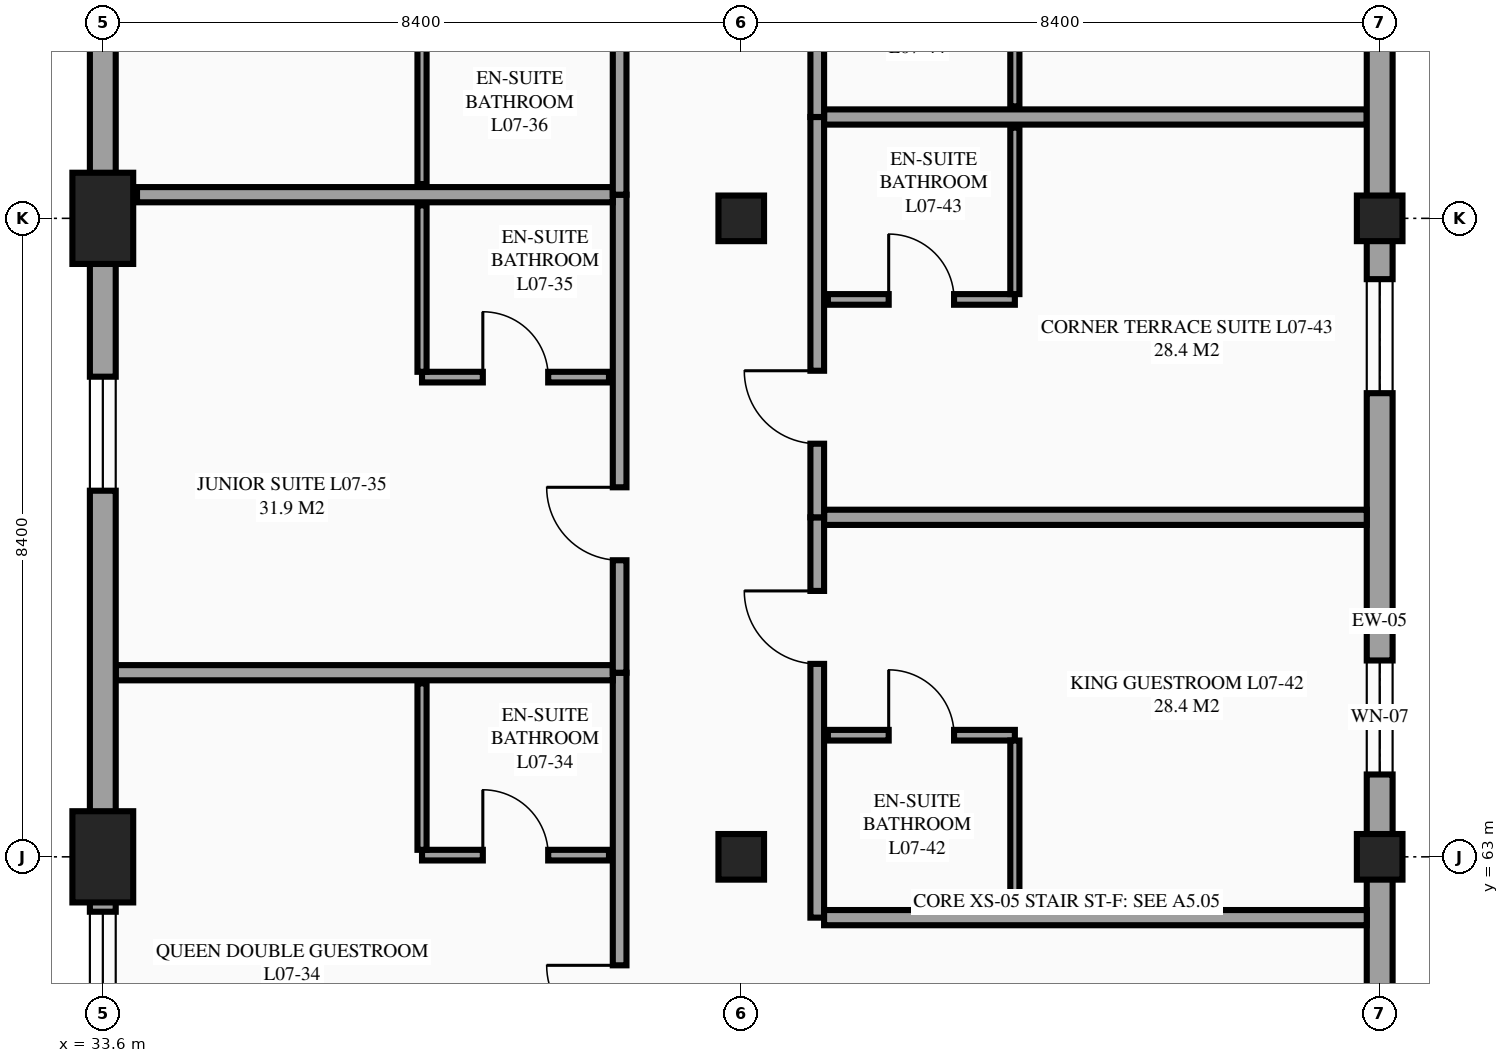
"""IFC4 building model, lengths in metres.
Left out: names, types, materials, properties, quantities, classifications, styles, units other than length and angle.
Written with IfcOpenShell. Run it as: python <this file> out.ifc"""

import sys

from ifc_helpers import new_model, si_unit, direction, frame, frame_2d, origin, origin_2d, place, context, subcontext, project, spatial, rectangle, extrude, element, fill, save


model = new_model("IFC4")
c1 = context("Model", 3, precision=1e-05, world=origin(), true_north=direction((0.0, 1.0)))
c2 = subcontext(c1, "Body", "Model", "MODEL_VIEW")
j1 = project(units=[si_unit("LENGTHUNIT", "METRE"), si_unit("PLANEANGLEUNIT", "RADIAN")], contexts=[c1])
p1 = place(None, origin())
s1 = spatial("IfcSite", under=j1, at=p1, CompositionType="ELEMENT")
p2 = place(p1, origin())
s2 = spatial("IfcBuilding", under=s1, at=p2, CompositionType="ELEMENT")
p3 = place(p2, frame((0.0, 0.0, 29.1)))
s3 = spatial("IfcBuildingStorey", under=s2, at=p3, CompositionType="ELEMENT", Elevation=29.1)
for number, where, z_axis, x_axis in (
    (1, (33.6, 63.0, 0.0), (0.0, 0.0, 1.0), (1.0, 0.0, 0.0)),
    (2, (33.6, 71.4, 0.0), (0.0, 0.0, 1.0), (1.0, 0.0, 0.0)),
):
    element("IfcColumn", number, at=place(p3, frame(where, z_axis=z_axis, x_axis=x_axis)), inside=s3, PredefinedType="COLUMN", context=c2, shape_type="SweptSolid", body=[
        extrude(rectangle(XDim=0.8, YDim=1.2, at=origin_2d()), origin(), (0.0, 0.0, 1.0), 3.6),
    ])
for number, where, z_axis, x_axis in (
    (3, (42.0, 63.0, 0.0), (0.0, 0.0, 1.0), (1.0, 0.0, 0.0)),
    (4, (42.0, 71.4, 0.0), (0.0, 0.0, 1.0), (1.0, 0.0, 0.0)),
    (5, (50.4, 63.0, 0.0), (0.0, 0.0, 1.0), (1.0, 0.0, 0.0)),
    (6, (50.4, 71.4, 0.0), (0.0, 0.0, 1.0), (1.0, 0.0, 0.0)),
):
    element("IfcColumn", number, at=place(p3, frame(where, z_axis=z_axis, x_axis=x_axis)), inside=s3, PredefinedType="COLUMN", context=c2, shape_type="SweptSolid", body=[
        extrude(rectangle(XDim=0.6, YDim=0.6, at=origin_2d()), origin(), (0.0, 0.0, 1.0), 3.6),
    ])
p4 = place(p3, frame((50.4, 60.8, 0.0), z_axis=(0.0, 0.0, 1.0), x_axis=(0.0, 1.0, 0.0)))
e7 = element("IfcWall", 7, at=p4, inside=s3, PredefinedType="STANDARD", context=c2, shape_type="SweptSolid", body=[
    extrude(rectangle(XDim=10.6, YDim=0.34, at=frame_2d((5.3, 0.0))), origin(), (0.0, 0.0, 1.0), 2.48),
])
p5 = place(p4, frame((3.283, 0.0, 0.85)))
e8 = element("IfcOpeningElement", 8, at=p5, cuts=e7, PredefinedType="OPENING", context=c2, shape_type="SweptSolid", body=[
    extrude(rectangle(XDim=1.5, YDim=1.5, at=frame_2d((0.75, 0.75))), frame((0.0, 0.18, 0.0), z_axis=(0.0, -1.0, 0.0), x_axis=(1.0, 0.0, 0.0)), (0.0, 0.0, 1.0), 0.36),
])
p6 = place(p4, frame((8.3, 0.0, 0.85)))
e9 = element("IfcOpeningElement", 9, at=p6, cuts=e7, PredefinedType="OPENING", context=c2, shape_type="SweptSolid", body=[
    extrude(rectangle(XDim=1.5, YDim=1.5, at=frame_2d((0.75, 0.75))), frame((0.0, 0.18, 0.0), z_axis=(0.0, -1.0, 0.0), x_axis=(1.0, 0.0, 0.0)), (0.0, 0.0, 1.0), 0.36),
])
p7 = place(p3, frame((40.4, 59.133, 0.0), z_axis=(0.0, 0.0, 1.0), x_axis=(0.0, 1.0, 0.0)))
e10 = element("IfcWall", 10, at=p7, inside=s3, PredefinedType="PARTITIONING", context=c2, shape_type="SweptSolid", body=[
    extrude(rectangle(XDim=6.289, YDim=0.18, at=frame_2d((3.145, 0.0))), origin(), (0.0, 0.0, 1.0), 3.375),
])
p8 = place(p7, frame((1.479, 0.0, 0.0)))
e11 = element("IfcOpeningElement", 11, at=p8, cuts=e10, PredefinedType="OPENING", context=c2, shape_type="SweptSolid", body=[
    extrude(rectangle(XDim=0.96, YDim=2.15, at=frame_2d((0.48, 1.075))), frame((0.0, 0.1, 0.0), z_axis=(0.0, -1.0, 0.0), x_axis=(1.0, 0.0, 0.0)), (0.0, 0.0, 1.0), 0.2),
])
p9 = place(p3, frame((33.77, 65.422, 0.0), z_axis=(0.0, 0.0, 1.0), x_axis=(1.0, 0.0, 0.0)))
e12 = element("IfcWall", 12, at=p9, inside=s3, PredefinedType="PARTITIONING", context=c2, shape_type="SweptSolid", body=[
    extrude(rectangle(XDim=6.54, YDim=0.2, at=frame_2d((3.27, 0.0))), origin(), (0.0, 0.0, 1.0), 3.375),
])
p10 = place(p3, frame((37.8, 63.022, 0.0), z_axis=(0.0, 0.0, 1.0), x_axis=(1.0, 0.0, 0.0)))
e13 = element("IfcWall", 13, at=p10, inside=s3, PredefinedType="PARTITIONING", context=c2, shape_type="SweptSolid", body=[
    extrude(rectangle(XDim=2.46, YDim=0.14, at=frame_2d((1.23, 0.0))), origin(), (0.0, 0.0, 1.0), 2.68),
])
p11 = place(p10, frame((0.8, 0.0, 0.0)))
e14 = element("IfcOpeningElement", 14, at=p11, cuts=e13, PredefinedType="OPENING", context=c2, shape_type="SweptSolid", body=[
    extrude(rectangle(XDim=0.86, YDim=2.1, at=frame_2d((0.43, 1.05))), frame((0.0, 0.08, 0.0), z_axis=(0.0, -1.0, 0.0), x_axis=(1.0, 0.0, 0.0)), (0.0, 0.0, 1.0), 0.16),
])
p12 = place(p3, frame((37.8, 63.092, 0.0), z_axis=(0.0, 0.0, 1.0), x_axis=(0.0, 1.0, 0.0)))
e15 = element("IfcWall", 15, at=p12, inside=s3, PredefinedType="PARTITIONING", context=c2, shape_type="SweptSolid", body=[
    extrude(rectangle(XDim=2.19, YDim=0.12, at=frame_2d((1.095, 0.0))), origin(), (0.0, 0.0, 1.0), 3.375),
])
p13 = place(p3, frame((40.4, 65.422, 0.0), z_axis=(0.0, 0.0, 1.0), x_axis=(0.0, 1.0, 0.0)))
e16 = element("IfcWall", 16, at=p13, inside=s3, PredefinedType="PARTITIONING", context=c2, shape_type="SweptSolid", body=[
    extrude(rectangle(XDim=6.289, YDim=0.18, at=frame_2d((3.145, 0.0))), origin(), (0.0, 0.0, 1.0), 3.375),
])
p14 = place(p13, frame((1.479, 0.0, 0.0)))
e17 = element("IfcOpeningElement", 17, at=p14, cuts=e16, PredefinedType="OPENING", context=c2, shape_type="SweptSolid", body=[
    extrude(rectangle(XDim=0.96, YDim=2.15, at=frame_2d((0.48, 1.075))), frame((0.0, 0.1, 0.0), z_axis=(0.0, -1.0, 0.0), x_axis=(1.0, 0.0, 0.0)), (0.0, 0.0, 1.0), 0.2),
])
p15 = place(p3, frame((34.05, 71.711, 0.0), z_axis=(0.0, 0.0, 1.0), x_axis=(1.0, 0.0, 0.0)))
e18 = element("IfcWall", 18, at=p15, inside=s3, PredefinedType="PARTITIONING", context=c2, shape_type="SweptSolid", body=[
    extrude(rectangle(XDim=6.26, YDim=0.2, at=frame_2d((3.13, 0.0))), origin(), (0.0, 0.0, 1.0), 3.375),
])
p16 = place(p3, frame((37.8, 69.311, 0.0), z_axis=(0.0, 0.0, 1.0), x_axis=(1.0, 0.0, 0.0)))
e19 = element("IfcWall", 19, at=p16, inside=s3, PredefinedType="PARTITIONING", context=c2, shape_type="SweptSolid", body=[
    extrude(rectangle(XDim=2.46, YDim=0.14, at=frame_2d((1.23, 0.0))), origin(), (0.0, 0.0, 1.0), 3.375),
])
p17 = place(p16, frame((0.8, 0.0, 0.0)))
e20 = element("IfcOpeningElement", 20, at=p17, cuts=e19, PredefinedType="OPENING", context=c2, shape_type="SweptSolid", body=[
    extrude(rectangle(XDim=0.86, YDim=2.1, at=frame_2d((0.43, 1.05))), frame((0.0, 0.08, 0.0), z_axis=(0.0, -1.0, 0.0), x_axis=(1.0, 0.0, 0.0)), (0.0, 0.0, 1.0), 0.16),
])
p18 = place(p3, frame((37.8, 69.381, 0.0), z_axis=(0.0, 0.0, 1.0), x_axis=(0.0, 1.0, 0.0)))
e21 = element("IfcWall", 21, at=p18, inside=s3, PredefinedType="PARTITIONING", context=c2, shape_type="SweptSolid", body=[
    extrude(rectangle(XDim=2.19, YDim=0.12, at=frame_2d((1.095, 0.0))), origin(), (0.0, 0.0, 1.0), 3.375),
])
p19 = place(p3, frame((40.4, 71.711, 0.0), z_axis=(0.0, 0.0, 1.0), x_axis=(0.0, 1.0, 0.0)))
e22 = element("IfcWall", 22, at=p19, inside=s3, PredefinedType="PARTITIONING", context=c2, shape_type="SweptSolid", body=[
    extrude(rectangle(XDim=6.289, YDim=0.18, at=frame_2d((3.145, 0.0))), origin(), (0.0, 0.0, 1.0), 3.375),
])
p20 = place(p19, frame((3.849, 0.0, 0.0)))
e23 = element("IfcOpeningElement", 23, at=p20, cuts=e22, PredefinedType="OPENING", context=c2, shape_type="SweptSolid", body=[
    extrude(rectangle(XDim=0.96, YDim=2.15, at=frame_2d((0.48, 1.075))), frame((0.0, 0.1, 0.0), z_axis=(0.0, -1.0, 0.0), x_axis=(1.0, 0.0, 0.0)), (0.0, 0.0, 1.0), 0.2),
])
p21 = place(p3, frame((37.8, 71.851, 0.0), z_axis=(0.0, 0.0, 1.0), x_axis=(0.0, 1.0, 0.0)))
e24 = element("IfcWall", 24, at=p21, inside=s3, PredefinedType="PARTITIONING", context=c2, shape_type="SweptSolid", body=[
    extrude(rectangle(XDim=2.19, YDim=0.12, at=frame_2d((1.095, 0.0))), origin(), (0.0, 0.0, 1.0), 3.375),
])
p22 = place(p3, frame((43.0, 62.2, 0.0), z_axis=(0.0, 0.0, 1.0), x_axis=(0.0, 1.0, 0.0)))
e25 = element("IfcWall", 25, at=p22, inside=s3, PredefinedType="PARTITIONING", context=c2, shape_type="SweptSolid", body=[
    extrude(rectangle(XDim=5.267, YDim=0.18, at=frame_2d((2.633, 0.0))), origin(), (0.0, 0.0, 1.0), 3.375),
])
p23 = place(p22, frame((3.338, 0.0, 0.0)))
e26 = element("IfcOpeningElement", 26, at=p23, cuts=e25, PredefinedType="OPENING", context=c2, shape_type="SweptSolid", body=[
    extrude(rectangle(XDim=0.96, YDim=2.15, at=frame_2d((0.48, 1.075))), frame((0.0, 0.1, 0.0), z_axis=(0.0, -1.0, 0.0), x_axis=(1.0, 0.0, 0.0)), (0.0, 0.0, 1.0), 0.2),
])
for number, where, z_axis, x_axis in (
    (27, (43.09, 62.2, 0.0), (0.0, 0.0, 1.0), (1.0, 0.0, 0.0)),
    (28, (43.09, 67.467, 0.0), (0.0, 0.0, 1.0), (1.0, 0.0, 0.0)),
):
    element("IfcWall", number, at=place(p3, frame(where, z_axis=z_axis, x_axis=x_axis)), inside=s3, PredefinedType="PARTITIONING", context=c2, shape_type="SweptSolid", body=[
        extrude(rectangle(XDim=7.14, YDim=0.2, at=frame_2d((3.57, 0.0))), origin(), (0.0, 0.0, 1.0), 3.375),
    ])
p24 = place(p3, frame((43.14, 64.6, 0.0), z_axis=(0.0, 0.0, 1.0), x_axis=(1.0, 0.0, 0.0)))
e29 = element("IfcWall", 29, at=p24, inside=s3, PredefinedType="PARTITIONING", context=c2, shape_type="SweptSolid", body=[
    extrude(rectangle(XDim=2.46, YDim=0.14, at=frame_2d((1.23, 0.0))), origin(), (0.0, 0.0, 1.0), 3.375),
])
p25 = place(p24, frame((0.8, 0.0, 0.0)))
e30 = element("IfcOpeningElement", 30, at=p25, cuts=e29, PredefinedType="OPENING", context=c2, shape_type="SweptSolid", body=[
    extrude(rectangle(XDim=0.86, YDim=2.1, at=frame_2d((0.43, 1.05))), frame((0.0, 0.08, 0.0), z_axis=(0.0, -1.0, 0.0), x_axis=(1.0, 0.0, 0.0)), (0.0, 0.0, 1.0), 0.16),
])
p26 = place(p3, frame((45.6, 62.34, 0.0), z_axis=(0.0, 0.0, 1.0), x_axis=(0.0, 1.0, 0.0)))
e31 = element("IfcWall", 31, at=p26, inside=s3, PredefinedType="PARTITIONING", context=c2, shape_type="SweptSolid", body=[
    extrude(rectangle(XDim=2.19, YDim=0.12, at=frame_2d((1.095, 0.0))), origin(), (0.0, 0.0, 1.0), 3.375),
])
p27 = place(p3, frame((43.0, 67.467, 0.0), z_axis=(0.0, 0.0, 1.0), x_axis=(0.0, 1.0, 0.0)))
e32 = element("IfcWall", 32, at=p27, inside=s3, PredefinedType="PARTITIONING", context=c2, shape_type="SweptSolid", body=[
    extrude(rectangle(XDim=5.267, YDim=0.18, at=frame_2d((2.633, 0.0))), origin(), (0.0, 0.0, 1.0), 3.375),
])
p28 = place(p27, frame((0.968, 0.0, 0.0)))
e33 = element("IfcOpeningElement", 33, at=p28, cuts=e32, PredefinedType="OPENING", context=c2, shape_type="SweptSolid", body=[
    extrude(rectangle(XDim=0.96, YDim=2.15, at=frame_2d((0.48, 1.075))), frame((0.0, 0.1, 0.0), z_axis=(0.0, -1.0, 0.0), x_axis=(1.0, 0.0, 0.0)), (0.0, 0.0, 1.0), 0.2),
])
p29 = place(p3, frame((43.09, 72.733, 0.0), z_axis=(0.0, 0.0, 1.0), x_axis=(1.0, 0.0, 0.0)))
e34 = element("IfcWall", 34, at=p29, inside=s3, PredefinedType="PARTITIONING", context=c2, shape_type="SweptSolid", body=[
    extrude(rectangle(XDim=7.14, YDim=0.2, at=frame_2d((3.57, 0.0))), origin(), (0.0, 0.0, 1.0), 3.375),
])
p30 = place(p3, frame((43.14, 70.333, 0.0), z_axis=(0.0, 0.0, 1.0), x_axis=(1.0, 0.0, 0.0)))
e35 = element("IfcWall", 35, at=p30, inside=s3, PredefinedType="PARTITIONING", context=c2, shape_type="SweptSolid", body=[
    extrude(rectangle(XDim=2.46, YDim=0.14, at=frame_2d((1.23, 0.0))), origin(), (0.0, 0.0, 1.0), 3.375),
])
p31 = place(p30, frame((0.8, 0.0, 0.0)))
e36 = element("IfcOpeningElement", 36, at=p31, cuts=e35, PredefinedType="OPENING", context=c2, shape_type="SweptSolid", body=[
    extrude(rectangle(XDim=0.86, YDim=2.1, at=frame_2d((0.43, 1.05))), frame((0.0, 0.08, 0.0), z_axis=(0.0, -1.0, 0.0), x_axis=(1.0, 0.0, 0.0)), (0.0, 0.0, 1.0), 0.16),
])
p32 = place(p3, frame((45.6, 70.403, 0.0), z_axis=(0.0, 0.0, 1.0), x_axis=(0.0, 1.0, 0.0)))
e37 = element("IfcWall", 37, at=p32, inside=s3, PredefinedType="PARTITIONING", context=c2, shape_type="SweptSolid", body=[
    extrude(rectangle(XDim=2.19, YDim=0.12, at=frame_2d((1.095, 0.0))), origin(), (0.0, 0.0, 1.0), 3.375),
])
p33 = place(p3, frame((43.0, 72.733, 0.0), z_axis=(0.0, 0.0, 1.0), x_axis=(0.0, 1.0, 0.0)))
e38 = element("IfcWall", 38, at=p33, inside=s3, PredefinedType="PARTITIONING", context=c2, shape_type="SweptSolid", body=[
    extrude(rectangle(XDim=5.267, YDim=0.18, at=frame_2d((2.633, 0.0))), origin(), (0.0, 0.0, 1.0), 3.375),
])
p34 = place(p33, frame((3.338, 0.0, 0.0)))
e39 = element("IfcOpeningElement", 39, at=p34, cuts=e38, PredefinedType="OPENING", context=c2, shape_type="SweptSolid", body=[
    extrude(rectangle(XDim=0.96, YDim=2.15, at=frame_2d((0.48, 1.075))), frame((0.0, 0.1, 0.0), z_axis=(0.0, -1.0, 0.0), x_axis=(1.0, 0.0, 0.0)), (0.0, 0.0, 1.0), 0.2),
])
p35 = place(p3, frame((45.6, 72.873, 0.0), z_axis=(0.0, 0.0, 1.0), x_axis=(0.0, 1.0, 0.0)))
e40 = element("IfcWall", 40, at=p35, inside=s3, PredefinedType="PARTITIONING", context=c2, shape_type="SweptSolid", body=[
    extrude(rectangle(XDim=2.19, YDim=0.12, at=frame_2d((1.095, 0.0))), origin(), (0.0, 0.0, 1.0), 3.375),
])
p36 = place(p3, frame((50.4, 71.4, 0.0), z_axis=(0.0, 0.0, 1.0), x_axis=(0.0, 1.0, 0.0)))
e41 = element("IfcWall", 41, at=p36, inside=s3, PredefinedType="STANDARD", context=c2, shape_type="SweptSolid", body=[
    extrude(rectangle(XDim=8.4, YDim=0.34, at=frame_2d((4.2, 0.0))), origin(), (0.0, 0.0, 1.0), 3.126),
])
p37 = place(p36, frame((3.217, 0.0, 0.85)))
e42 = element("IfcOpeningElement", 42, at=p37, cuts=e41, PredefinedType="OPENING", context=c2, shape_type="SweptSolid", body=[
    extrude(rectangle(XDim=1.5, YDim=1.5, at=frame_2d((0.75, 0.75))), frame((0.0, 0.18, 0.0), z_axis=(0.0, -1.0, 0.0), x_axis=(1.0, 0.0, 0.0)), (0.0, 0.0, 1.0), 0.36),
])
p38 = place(p3, frame((33.6, 79.8, 0.0), z_axis=(0.0, 0.0, 1.0), x_axis=(0.0, -1.0, 0.0)))
e43 = element("IfcWall", 43, at=p38, inside=s3, PredefinedType="STANDARD", context=c2, shape_type="SweptSolid", body=[
    extrude(rectangle(XDim=16.8, YDim=0.34, at=frame_2d((8.4, 0.0))), origin(), (0.0, 0.0, 1.0), 2.63),
])
p39 = place(p38, frame((10.483, 0.0, 0.85)))
e44 = element("IfcOpeningElement", 44, at=p39, cuts=e43, PredefinedType="OPENING", context=c2, shape_type="SweptSolid", body=[
    extrude(rectangle(XDim=1.5, YDim=1.5, at=frame_2d((0.75, 0.75))), frame((0.0, 0.18, 0.0), z_axis=(0.0, -1.0, 0.0), x_axis=(1.0, 0.0, 0.0)), (0.0, 0.0, 1.0), 0.36),
])
p40 = place(p38, frame((4.195, 0.0, 0.85)))
e45 = element("IfcOpeningElement", 45, at=p40, cuts=e43, PredefinedType="OPENING", context=c2, shape_type="SweptSolid", body=[
    extrude(rectangle(XDim=1.5, YDim=1.5, at=frame_2d((0.75, 0.75))), frame((0.0, 0.18, 0.0), z_axis=(0.0, -1.0, 0.0), x_axis=(1.0, 0.0, 0.0)), (0.0, 0.0, 1.0), 0.36),
])
p41 = place(p3, frame((33.6, 63.0, 0.0), z_axis=(0.0, 0.0, 1.0), x_axis=(0.0, -1.0, 0.0)))
e46 = element("IfcWall", 46, at=p41, inside=s3, PredefinedType="STANDARD", context=c2, shape_type="SweptSolid", body=[
    extrude(rectangle(XDim=8.4, YDim=0.34, at=frame_2d((4.2, 0.0))), origin(), (0.0, 0.0, 1.0), 3.126),
])
p42 = place(p41, frame((6.261, 0.0, 0.85)))
e47 = element("IfcOpeningElement", 47, at=p42, cuts=e46, PredefinedType="OPENING", context=c2, shape_type="SweptSolid", body=[
    extrude(rectangle(XDim=1.5, YDim=1.5, at=frame_2d((0.75, 0.75))), frame((0.0, 0.18, 0.0), z_axis=(0.0, -1.0, 0.0), x_axis=(1.0, 0.0, 0.0)), (0.0, 0.0, 1.0), 0.36),
])
p43 = place(p41, frame((0.722, 0.0, 0.85)))
e48 = element("IfcOpeningElement", 48, at=p43, cuts=e46, PredefinedType="OPENING", context=c2, shape_type="SweptSolid", body=[
    extrude(rectangle(XDim=1.5, YDim=1.5, at=frame_2d((0.75, 0.75))), frame((0.0, 0.18, 0.0), z_axis=(0.0, -1.0, 0.0), x_axis=(1.0, 0.0, 0.0)), (0.0, 0.0, 1.0), 0.36),
])
p44 = place(p43, origin())
e49 = element("IfcWindow", 49, at=p44, inside=s3, PartitioningType="SINGLE_PANEL", PredefinedType="WINDOW", context=c2, shape_type="SweptSolid", body=[
    extrude(rectangle(XDim=1.5, YDim=1.5, at=frame_2d((0.75, 0.75))), frame((0.0, 0.03, 0.0), z_axis=(0.0, -1.0, 0.0), x_axis=(1.0, 0.0, 0.0)), (0.0, 0.0, 1.0), 0.06),
])
fill(e48, e49)
p45 = place(p39, origin())
e50 = element("IfcWindow", 50, at=p45, inside=s3, PartitioningType="SINGLE_PANEL", PredefinedType="WINDOW", context=c2, shape_type="SweptSolid", body=[
    extrude(rectangle(XDim=1.5, YDim=1.5, at=frame_2d((0.75, 0.75))), frame((0.0, 0.03, 0.0), z_axis=(0.0, -1.0, 0.0), x_axis=(1.0, 0.0, 0.0)), (0.0, 0.0, 1.0), 0.06),
])
fill(e44, e50)
p46 = place(p5, origin())
e51 = element("IfcWindow", 51, at=p46, inside=s3, PartitioningType="SINGLE_PANEL", PredefinedType="WINDOW", context=c2, shape_type="SweptSolid", body=[
    extrude(rectangle(XDim=1.5, YDim=1.5, at=frame_2d((0.75, 0.75))), frame((0.0, 0.03, 0.0), z_axis=(0.0, -1.0, 0.0), x_axis=(1.0, 0.0, 0.0)), (0.0, 0.0, 1.0), 0.06),
])
fill(e8, e51)
p47 = place(p6, origin())
e52 = element("IfcWindow", 52, at=p47, inside=s3, PartitioningType="SINGLE_PANEL", PredefinedType="WINDOW", context=c2, shape_type="SweptSolid", body=[
    extrude(rectangle(XDim=1.5, YDim=1.5, at=frame_2d((0.75, 0.75))), frame((0.0, 0.03, 0.0), z_axis=(0.0, -1.0, 0.0), x_axis=(1.0, 0.0, 0.0)), (0.0, 0.0, 1.0), 0.06),
])
fill(e9, e52)
p48 = place(p8, origin())
e53 = element("IfcDoor", 53, at=p48, inside=s3, OperationType="SINGLE_SWING_RIGHT", PredefinedType="DOOR", context=c2, shape_type="SweptSolid", body=[
    extrude(rectangle(XDim=0.96, YDim=2.15, at=frame_2d((0.48, 1.075))), frame((0.0, 0.025, 0.0), z_axis=(0.0, -1.0, 0.0), x_axis=(1.0, 0.0, 0.0)), (0.0, 0.0, 1.0), 0.05),
])
fill(e11, e53)
p49 = place(p11, origin())
e54 = element("IfcDoor", 54, at=p49, inside=s3, OperationType="SINGLE_SWING_LEFT", PredefinedType="DOOR", context=c2, shape_type="SweptSolid", body=[
    extrude(rectangle(XDim=0.86, YDim=2.1, at=frame_2d((0.43, 1.05))), frame((0.0, 0.025, 0.0), z_axis=(0.0, -1.0, 0.0), x_axis=(1.0, 0.0, 0.0)), (0.0, 0.0, 1.0), 0.05),
])
fill(e14, e54)
p50 = place(p14, origin())
e55 = element("IfcDoor", 55, at=p50, inside=s3, OperationType="SINGLE_SWING_RIGHT", PredefinedType="DOOR", context=c2, shape_type="SweptSolid", body=[
    extrude(rectangle(XDim=0.96, YDim=2.15, at=frame_2d((0.48, 1.075))), frame((0.0, 0.025, 0.0), z_axis=(0.0, -1.0, 0.0), x_axis=(1.0, 0.0, 0.0)), (0.0, 0.0, 1.0), 0.05),
])
fill(e17, e55)
p51 = place(p17, origin())
e56 = element("IfcDoor", 56, at=p51, inside=s3, OperationType="SINGLE_SWING_LEFT", PredefinedType="DOOR", context=c2, shape_type="SweptSolid", body=[
    extrude(rectangle(XDim=0.86, YDim=2.1, at=frame_2d((0.43, 1.05))), frame((0.0, 0.025, 0.0), z_axis=(0.0, -1.0, 0.0), x_axis=(1.0, 0.0, 0.0)), (0.0, 0.0, 1.0), 0.05),
])
fill(e20, e56)
p52 = place(p23, origin())
e57 = element("IfcDoor", 57, at=p52, inside=s3, OperationType="SINGLE_SWING_RIGHT", PredefinedType="DOOR", context=c2, shape_type="SweptSolid", body=[
    extrude(rectangle(XDim=0.96, YDim=2.15, at=frame_2d((0.48, 1.075))), frame((0.0, 0.025, 0.0), z_axis=(0.0, -1.0, 0.0), x_axis=(1.0, 0.0, 0.0)), (0.0, 0.0, 1.0), 0.05),
])
fill(e26, e57)
p53 = place(p25, origin())
e58 = element("IfcDoor", 58, at=p53, inside=s3, OperationType="SINGLE_SWING_LEFT", PredefinedType="DOOR", context=c2, shape_type="SweptSolid", body=[
    extrude(rectangle(XDim=0.86, YDim=2.1, at=frame_2d((0.43, 1.05))), frame((0.0, 0.025, 0.0), z_axis=(0.0, -1.0, 0.0), x_axis=(1.0, 0.0, 0.0)), (0.0, 0.0, 1.0), 0.05),
])
fill(e30, e58)
p54 = place(p28, origin())
e59 = element("IfcDoor", 59, at=p54, inside=s3, OperationType="SINGLE_SWING_RIGHT", PredefinedType="DOOR", context=c2, shape_type="SweptSolid", body=[
    extrude(rectangle(XDim=0.96, YDim=2.15, at=frame_2d((0.48, 1.075))), frame((0.0, 0.025, 0.0), z_axis=(0.0, -1.0, 0.0), x_axis=(1.0, 0.0, 0.0)), (0.0, 0.0, 1.0), 0.05),
])
fill(e33, e59)
p55 = place(p31, origin())
e60 = element("IfcDoor", 60, at=p55, inside=s3, OperationType="SINGLE_SWING_LEFT", PredefinedType="DOOR", context=c2, shape_type="SweptSolid", body=[
    extrude(rectangle(XDim=0.86, YDim=2.1, at=frame_2d((0.43, 1.05))), frame((0.0, 0.025, 0.0), z_axis=(0.0, -1.0, 0.0), x_axis=(1.0, 0.0, 0.0)), (0.0, 0.0, 1.0), 0.05),
])
fill(e36, e60)
save(model, sys.argv[1])
